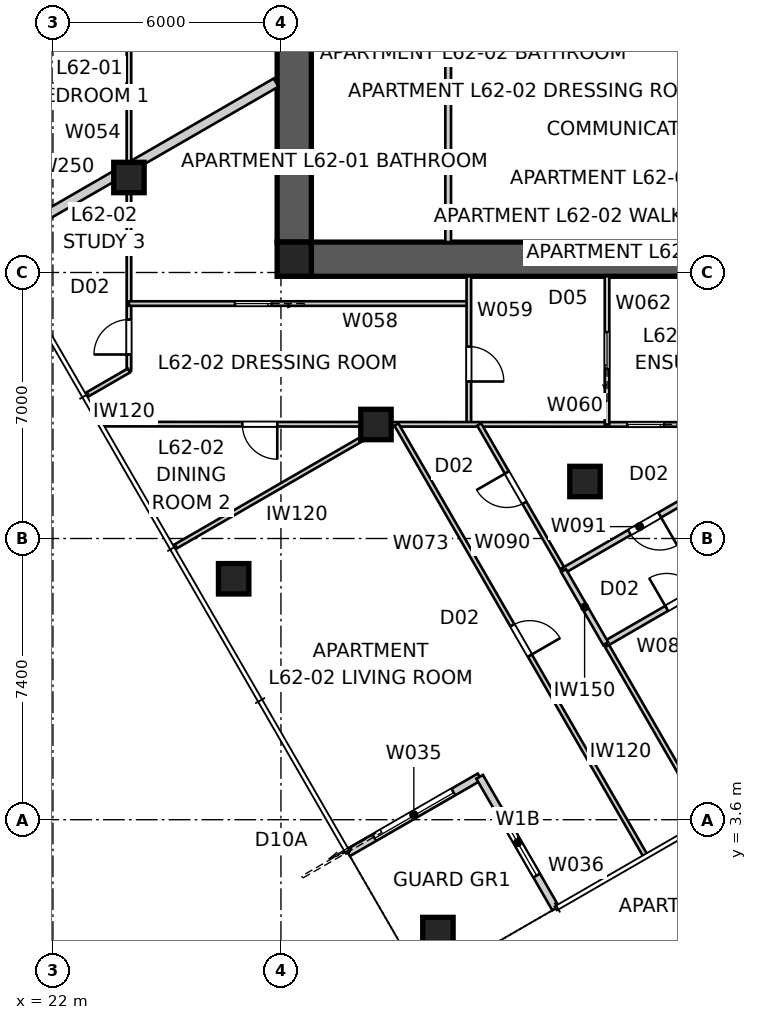
"""IFC4 building model, lengths in metres.
Left out: names, types, materials, properties, quantities, classifications, styles, units other than length and angle.
Written with IfcOpenShell. Run it as: python <this file> out.ifc"""

import sys

from ifc_helpers import new_model, si_unit, direction, frame, frame_2d, origin, origin_2d, place, context, subcontext, project, spatial, polyline, rectangle, outline, extrude, element, fill, save


model = new_model("IFC4")
c1 = context("Model", 3, precision=1e-05, world=origin(), true_north=direction((0.0, 1.0)))
c2 = subcontext(c1, "Body", "Model", "MODEL_VIEW")
j1 = project(units=[si_unit("LENGTHUNIT", "METRE"), si_unit("PLANEANGLEUNIT", "RADIAN")], contexts=[c1])
p1 = place(None, origin())
s1 = spatial("IfcSite", under=j1, at=p1, CompositionType="ELEMENT")
p2 = place(p1, origin())
s2 = spatial("IfcBuilding", under=s1, at=p2, CompositionType="ELEMENT")
p3 = place(p2, frame((0.0, 0.0, 225.2)))
s3 = spatial("IfcBuildingStorey", under=s2, at=p3, CompositionType="ELEMENT", Elevation=225.2)
p4 = place(p3, frame((51.2, 18.35, 0.0), z_axis=(0.0, 0.0, 1.0), x_axis=(-1.0, 0.0, 0.0)))
e1 = element("IfcWall", 1, at=p4, inside=s3, PredefinedType="SHEAR", context=c2, shape_type="SweptSolid", body=[
    extrude(outline(polyline([(0.0, -0.45), (22.4, -0.45), (22.4, -0.025), (22.85, -0.025), (22.85, 0.025), (22.4, 0.025), (22.4, 0.45), (0.0, 0.45), (0.0, 0.025), (-0.45, 0.025), (-0.45, -0.025), (0.0, -0.025), (0.0, -0.45)])), origin(), (0.0, 0.0, 1.0), 3.4),
])
p5 = place(p3, frame((28.35, 41.2, 0.0), z_axis=(0.0, 0.0, 1.0), x_axis=(0.0, -1.0, 0.0)))
e2 = element("IfcWall", 2, at=p5, inside=s3, PredefinedType="SHEAR", context=c2, shape_type="SweptSolid", body=[
    extrude(outline(polyline([(0.0, -0.45), (22.4, -0.45), (22.4, -0.025), (22.85, -0.025), (22.85, 0.025), (22.4, 0.025), (22.4, 0.45), (0.0, 0.45), (0.0, 0.025), (-0.45, 0.025), (-0.45, -0.025), (0.0, -0.025), (0.0, -0.45)])), origin(), (0.0, 0.0, 1.0), 3.4),
])
p6 = place(p5, frame((11.14, 0.0, 0.0)))
e3 = element("IfcOpeningElement", 3, at=p6, cuts=e2, PredefinedType="OPENING", context=c2, shape_type="SweptSolid", body=[
    extrude(rectangle(XDim=1.02, YDim=2.4, at=frame_2d((0.51, 1.2))), frame((0.0, 0.46, 0.0), z_axis=(0.0, -1.0, 0.0), x_axis=(1.0, 0.0, 0.0)), (0.0, 0.0, 1.0), 0.92),
])
p7 = place(p3, frame((28.35, 18.35, 0.0), z_axis=(0.0, 0.0, 1.0), x_axis=(1.0, 0.0, 0.0)))
e4 = element("IfcColumn", 4, at=p7, inside=s3, PredefinedType="COLUMN", context=c2, shape_type="SweptSolid", body=[
    extrude(rectangle(XDim=0.9, YDim=0.9, at=origin_2d()), origin(), (0.0, 0.0, 1.0), 3.4),
])
for number, where, z_axis, x_axis in (
    (5, (32.13, 0.63, 0.0), (0.0, 0.0, 1.0), (1.0, 0.0, 0.0)),
    (6, (26.755, 9.94, 0.0), (0.0, 0.0, 1.0), (1.0, 0.0, 0.0)),
    (7, (24.0, 20.5, 0.0), (0.0, 0.0, 1.0), (1.0, 0.0, 0.0)),
    (8, (30.5, 14.0, 0.0), (0.0, 0.0, 1.0), (1.0, 0.0, 0.0)),
    (9, (36.0, 12.5, 0.0), (0.0, 0.0, 1.0), (1.0, 0.0, 0.0)),
):
    element("IfcColumn", number, at=place(p3, frame(where, z_axis=z_axis, x_axis=x_axis)), inside=s3, PredefinedType="COLUMN", context=c2, shape_type="SweptSolid", body=[
        extrude(rectangle(XDim=0.8, YDim=0.8, at=origin_2d()), origin(), (0.0, 0.0, 1.0), 3.4),
    ])
p8 = place(p3, frame((29.764, 2.729, 0.0), z_axis=(0.0, 0.0, 1.0), x_axis=(0.866026010844, 0.49999894854, 0.0)))
e10 = element("IfcWall", 10, at=p8, inside=s3, PredefinedType="SOLIDWALL", context=c2, shape_type="SweptSolid", body=[
    extrude(rectangle(XDim=4.0, YDim=0.2, at=frame_2d((2.0, 0.0))), origin(), (0.0, 0.0, 1.0), 3.25),
])
p9 = place(p8, frame((0.8, 0.0, 0.0)))
e11 = element("IfcOpeningElement", 11, at=p9, cuts=e10, PredefinedType="OPENING", context=c2, shape_type="SweptSolid", body=[
    extrude(rectangle(XDim=2.4, YDim=2.1, at=frame_2d((1.2, 1.05))), frame((0.0, 0.11, 0.0), z_axis=(0.0, -1.0, 0.0), x_axis=(1.0, 0.0, 0.0)), (0.0, 0.0, 1.0), 0.22),
])
p10 = place(p3, frame((33.229, 4.729, 0.0), z_axis=(0.0, 0.0, 1.0), x_axis=(0.49999894854, -0.866026010844, 0.0)))
e12 = element("IfcWall", 12, at=p10, inside=s3, PredefinedType="SOLIDWALL", context=c2, shape_type="SweptSolid", body=[
    extrude(rectangle(XDim=4.0, YDim=0.2, at=frame_2d((2.0, 0.0))), origin(), (0.0, 0.0, 1.0), 3.25),
])
p11 = place(p10, frame((1.0, 0.0, 0.45)))
e13 = element("IfcOpeningElement", 13, at=p11, cuts=e12, PredefinedType="OPENING", context=c2, shape_type="SweptSolid", body=[
    extrude(rectangle(XDim=2.0, YDim=1.8, at=frame_2d((1.0, 0.9))), frame((0.0, 0.11, 0.0), z_axis=(0.0, -1.0, 0.0), x_axis=(1.0, 0.0, 0.0)), (0.0, 0.0, 1.0), 0.22),
])
p12 = place(p3, frame((20.514, 18.75, 0.0), z_axis=(0.0, 0.0, 1.0), x_axis=(0.866020489494, 0.500008511703, 0.0)))
e14 = element("IfcWall", 14, at=p12, inside=s3, PredefinedType="PARTITIONING", context=c2, shape_type="SweptSolid", body=[
    extrude(rectangle(XDim=8.496, YDim=0.25, at=frame_2d((4.248, 0.0))), origin(), (0.0, 0.0, 1.0), 3.25),
])
p13 = place(p3, frame((32.4, 18.8, 0.0), z_axis=(0.0, 0.0, 1.0), x_axis=(0.0, 1.0, 0.0)))
e15 = element("IfcWall", 15, at=p13, inside=s3, PredefinedType="SOLIDWALL", context=c2, shape_type="SweptSolid", body=[
    extrude(rectangle(XDim=5.9, YDim=0.15, at=frame_2d((2.95, 0.0))), origin(), (0.0, 0.0, 1.0), 3.25),
])
p14 = place(p3, frame((24.0, 15.422, 0.0), z_axis=(0.0, 0.0, 1.0), x_axis=(0.0, 1.0, 0.0)))
e16 = element("IfcWall", 16, at=p14, inside=s3, PredefinedType="PARTITIONING", context=c2, shape_type="SweptSolid", body=[
    extrude(rectangle(XDim=11.177, YDim=0.12, at=frame_2d((5.588, 0.0))), origin(), (0.0, 0.0, 1.0), 2.55),
])
p15 = place(p14, frame((0.42, 0.0, 0.0)))
e17 = element("IfcOpeningElement", 17, at=p15, cuts=e16, PredefinedType="OPENING", context=c2, shape_type="SweptSolid", body=[
    extrude(rectangle(XDim=0.92, YDim=2.34, at=frame_2d((0.46, 1.17))), frame((0.0, 0.07, 0.0), z_axis=(0.0, -1.0, 0.0), x_axis=(1.0, 0.0, 0.0)), (0.0, 0.0, 1.0), 0.14),
])
p16 = place(p3, frame((24.0, 26.103, 0.0), z_axis=(0.0, 0.0, 1.0), x_axis=(-0.866033470286, -0.49998602815, 0.0)))
e18 = element("IfcWall", 18, at=p16, inside=s3, PredefinedType="PARTITIONING", context=c2, shape_type="SweptSolid", body=[
    extrude(rectangle(XDim=6.655, YDim=0.12, at=frame_2d((3.328, 0.0))), origin(), (0.0, 0.0, 1.0), 3.25),
])
p17 = place(p16, frame((2.887, 0.0, 0.0)))
e19 = element("IfcOpeningElement", 19, at=p17, cuts=e18, PredefinedType="OPENING", context=c2, shape_type="SweptSolid", body=[
    extrude(rectangle(XDim=0.92, YDim=2.34, at=frame_2d((0.46, 1.17))), frame((0.0, 0.07, 0.0), z_axis=(0.0, -1.0, 0.0), x_axis=(1.0, 0.0, 0.0)), (0.0, 0.0, 1.0), 0.14),
])
p18 = place(p3, frame((32.944, 17.183, 0.0), z_axis=(0.0, 0.0, 1.0), x_axis=(-1.0, 0.0, 0.0)))
e20 = element("IfcWall", 20, at=p18, inside=s3, PredefinedType="PARTITIONING", context=c2, shape_type="SweptSolid", body=[
    extrude(rectangle(XDim=8.944, YDim=0.12, at=frame_2d((4.472, 0.0))), origin(), (0.0, 0.0, 1.0), 3.25),
])
p19 = place(p18, frame((5.192, 0.0, 0.0)))
e21 = element("IfcOpeningElement", 21, at=p19, cuts=e20, PredefinedType="OPENING", context=c2, shape_type="SweptSolid", body=[
    extrude(rectangle(XDim=0.96, YDim=2.1, at=frame_2d((0.48, 1.05))), frame((0.0, 0.07, 0.0), z_axis=(0.0, -1.0, 0.0), x_axis=(1.0, 0.0, 0.0)), (0.0, 0.0, 1.0), 0.14),
])
p20 = place(p3, frame((32.944, 17.9, 0.0), z_axis=(0.0, 0.0, 1.0), x_axis=(0.0, -1.0, 0.0)))
e22 = element("IfcWall", 22, at=p20, inside=s3, PredefinedType="PARTITIONING", context=c2, shape_type="SweptSolid", body=[
    extrude(rectangle(XDim=3.9, YDim=0.12, at=frame_2d((1.95, 0.0))), origin(), (0.0, 0.0, 1.0), 3.25),
])
p21 = place(p20, frame((1.849, 0.0, 0.0)))
e23 = element("IfcOpeningElement", 23, at=p21, cuts=e22, PredefinedType="OPENING", context=c2, shape_type="SweptSolid", body=[
    extrude(rectangle(XDim=0.92, YDim=2.34, at=frame_2d((0.46, 1.17))), frame((0.0, 0.07, 0.0), z_axis=(0.0, -1.0, 0.0), x_axis=(1.0, 0.0, 0.0)), (0.0, 0.0, 1.0), 0.14),
])
p22 = place(p3, frame((40.217, 14.0, 0.0), z_axis=(0.0, 0.0, 1.0), x_axis=(-0.999999825002, 0.000591604877, 0.0)))
e24 = element("IfcWall", 24, at=p22, inside=s3, PredefinedType="PARTITIONING", context=c2, shape_type="SweptSolid", body=[
    extrude(rectangle(XDim=16.92, YDim=0.12, at=frame_2d((8.46, 0.0))), origin(), (0.0, 0.0, 1.0), 2.55),
])
p23 = place(p22, frame((2.14, 0.0, 0.0)))
e25 = element("IfcOpeningElement", 25, at=p23, cuts=e24, PredefinedType="OPENING", context=c2, shape_type="SweptSolid", body=[
    extrude(rectangle(XDim=0.96, YDim=2.1, at=frame_2d((0.48, 1.05))), frame((0.0, 0.07, 0.0), z_axis=(0.0, -1.0, 0.0), x_axis=(1.0, 0.0, 0.0)), (0.0, 0.0, 1.0), 0.14),
])
p24 = place(p22, frame((12.313, 0.0, 0.0)))
e26 = element("IfcOpeningElement", 26, at=p24, cuts=e24, PredefinedType="OPENING", context=c2, shape_type="SweptSolid", body=[
    extrude(rectangle(XDim=0.92, YDim=2.34, at=frame_2d((0.46, 1.17))), frame((0.0, 0.07, 0.0), z_axis=(0.0, -1.0, 0.0), x_axis=(1.0, 0.0, 0.0)), (0.0, 0.0, 1.0), 0.14),
])
p25 = place(p3, frame((22.862, 14.765, 0.0), z_axis=(0.0, 0.0, 1.0), x_axis=(0.866040225545, 0.499974327079, 0.0)))
e27 = element("IfcWall", 27, at=p25, inside=s3, PredefinedType="PARTITIONING", context=c2, shape_type="SweptSolid", body=[
    extrude(rectangle(XDim=1.314, YDim=0.12, at=frame_2d((0.657, 0.0))), origin(), (0.0, 0.0, 1.0), 3.25),
])
p26 = place(p3, frame((36.581, 14.0, 0.0), z_axis=(0.0, 0.0, 1.0), x_axis=(0.0, 1.0, 0.0)))
e28 = element("IfcWall", 28, at=p26, inside=s3, PredefinedType="PARTITIONING", context=c2, shape_type="SweptSolid", body=[
    extrude(rectangle(XDim=3.9, YDim=0.12, at=frame_2d((1.95, 0.0))), origin(), (0.0, 0.0, 1.0), 3.25),
])
p27 = place(p26, frame((1.47, 0.0, 0.0)))
e29 = element("IfcOpeningElement", 29, at=p27, cuts=e28, PredefinedType="OPENING", context=c2, shape_type="SweptSolid", body=[
    extrude(rectangle(XDim=0.96, YDim=2.1, at=frame_2d((0.48, 1.05))), frame((0.0, 0.07, 0.0), z_axis=(0.0, -1.0, 0.0), x_axis=(1.0, 0.0, 0.0)), (0.0, 0.0, 1.0), 0.14),
])
p28 = place(p3, frame((31.039, 14.0, 0.0), z_axis=(0.0, 0.0, 1.0), x_axis=(0.500006184843, -0.866021832934, 0.0)))
e30 = element("IfcWall", 30, at=p28, inside=s3, PredefinedType="PARTITIONING", context=c2, shape_type="SweptSolid", body=[
    extrude(rectangle(XDim=13.084, YDim=0.12, at=frame_2d((6.542, 0.0))), origin(), (0.0, 0.0, 1.0), 3.25),
])
p29 = place(p28, frame((6.102, 0.0, 0.0)))
e31 = element("IfcOpeningElement", 31, at=p29, cuts=e30, PredefinedType="OPENING", context=c2, shape_type="SweptSolid", body=[
    extrude(rectangle(XDim=0.92, YDim=2.34, at=frame_2d((0.46, 1.17))), frame((0.0, 0.07, 0.0), z_axis=(0.0, -1.0, 0.0), x_axis=(1.0, 0.0, 0.0)), (0.0, 0.0, 1.0), 0.14),
])
p30 = place(p3, frame((25.174, 10.759, 0.0), z_axis=(0.0, 0.0, 1.0), x_axis=(0.866023120914, 0.500003954026, 0.0)))
e32 = element("IfcWall", 32, at=p30, inside=s3, PredefinedType="PARTITIONING", context=c2, shape_type="SweptSolid", body=[
    extrude(rectangle(XDim=6.481, YDim=0.12, at=frame_2d((3.241, 0.0))), origin(), (0.0, 0.0, 1.0), 3.25),
])
p31 = place(p3, frame((39.214, 3.612, 0.0), z_axis=(0.0, 0.0, 1.0), x_axis=(-0.499995631649, 0.866027925839, 0.0)))
e33 = element("IfcWall", 33, at=p31, inside=s3, PredefinedType="PARTITIONING", context=c2, shape_type="SweptSolid", body=[
    extrude(rectangle(XDim=5.338, YDim=0.12, at=frame_2d((2.669, 0.0))), origin(), (0.0, 0.0, 1.0), 3.25),
])
p32 = place(p3, frame((36.545, 8.234, 0.0), z_axis=(0.0, 0.0, 1.0), x_axis=(0.866025598446, 0.499999662836, 0.0)))
e34 = element("IfcWall", 34, at=p32, inside=s3, PredefinedType="SOLIDWALL", context=c2, shape_type="SweptSolid", body=[
    extrude(rectangle(XDim=4.625, YDim=0.15, at=frame_2d((2.312, 0.0))), origin(), (0.0, 0.0, 1.0), 3.25),
])
p33 = place(p32, frame((1.853, 0.0, 0.0)))
e35 = element("IfcOpeningElement", 35, at=p33, cuts=e34, PredefinedType="OPENING", context=c2, shape_type="SweptSolid", body=[
    extrude(rectangle(XDim=0.92, YDim=2.34, at=frame_2d((0.46, 1.17))), frame((0.0, 0.085, 0.0), z_axis=(0.0, -1.0, 0.0), x_axis=(1.0, 0.0, 0.0)), (0.0, 0.0, 1.0), 0.17),
])
p34 = place(p3, frame((35.435, 10.156, 0.0), z_axis=(0.0, 0.0, 1.0), x_axis=(-0.499966886051, 0.866044521288, 0.0)))
e36 = element("IfcWall", 36, at=p34, inside=s3, PredefinedType="PARTITIONING", context=c2, shape_type="SweptSolid", body=[
    extrude(rectangle(XDim=4.438, YDim=0.12, at=frame_2d((2.219, 0.0))), origin(), (0.0, 0.0, 1.0), 3.25),
])
p35 = place(p34, frame((2.059, 0.0, 0.0)))
e37 = element("IfcOpeningElement", 37, at=p35, cuts=e36, PredefinedType="OPENING", context=c2, shape_type="SweptSolid", body=[
    extrude(rectangle(XDim=0.92, YDim=2.34, at=frame_2d((0.46, 1.17))), frame((0.0, 0.07, 0.0), z_axis=(0.0, -1.0, 0.0), x_axis=(1.0, 0.0, 0.0)), (0.0, 0.0, 1.0), 0.14),
])
p36 = place(p3, frame((39.441, 12.469, 0.0), z_axis=(0.0, 0.0, 1.0), x_axis=(-0.866025598446, -0.499999662836, 0.0)))
e38 = element("IfcWall", 38, at=p36, inside=s3, PredefinedType="SOLIDWALL", context=c2, shape_type="SweptSolid", body=[
    extrude(rectangle(XDim=4.625, YDim=0.15, at=frame_2d((2.312, 0.0))), origin(), (0.0, 0.0, 1.0), 3.25),
])
p37 = place(p36, frame((1.702, 0.0, 0.0)))
e39 = element("IfcOpeningElement", 39, at=p37, cuts=e38, PredefinedType="OPENING", context=c2, shape_type="SweptSolid", body=[
    extrude(rectangle(XDim=0.92, YDim=2.34, at=frame_2d((0.46, 1.17))), frame((0.0, 0.085, 0.0), z_axis=(0.0, -1.0, 0.0), x_axis=(1.0, 0.0, 0.0)), (0.0, 0.0, 1.0), 0.17),
])
p38 = place(p3, frame((35.435, 10.156, 0.0), z_axis=(0.0, 0.0, 1.0), x_axis=(0.500008142102, -0.866020702889, 0.0)))
e40 = element("IfcWall", 40, at=p38, inside=s3, PredefinedType="SOLIDWALL", context=c2, shape_type="SweptSolid", body=[
    extrude(rectangle(XDim=2.219, YDim=0.15, at=frame_2d((1.11, 0.0))), origin(), (0.0, 0.0, 1.0), 3.25),
])
p39 = place(p9, origin())
e41 = element("IfcDoor", 41, at=p39, inside=s3, OperationType="SLIDING_TO_LEFT", PredefinedType="DOOR", context=c2, shape_type="SweptSolid", body=[
    extrude(rectangle(XDim=2.4, YDim=2.1, at=frame_2d((1.2, 1.05))), frame((0.0, 0.025, 0.0), z_axis=(0.0, -1.0, 0.0), x_axis=(1.0, 0.0, 0.0)), (0.0, 0.0, 1.0), 0.05),
])
fill(e11, e41)
p40 = place(p11, origin())
e42 = element("IfcWindow", 42, at=p40, inside=s3, PartitioningType="SINGLE_PANEL", PredefinedType="WINDOW", context=c2, shape_type="SweptSolid", body=[
    extrude(rectangle(XDim=2.0, YDim=1.8, at=frame_2d((1.0, 0.9))), frame((0.0, 0.03, 0.0), z_axis=(0.0, -1.0, 0.0), x_axis=(1.0, 0.0, 0.0)), (0.0, 0.0, 1.0), 0.06),
])
fill(e13, e42)
p41 = place(p27, origin())
e43 = element("IfcDoor", 43, at=p41, inside=s3, OperationType="SLIDING_TO_LEFT", PredefinedType="DOOR", context=c2, shape_type="SweptSolid", body=[
    extrude(rectangle(XDim=0.96, YDim=2.1, at=frame_2d((0.48, 1.05))), frame((0.0, 0.025, 0.0), z_axis=(0.0, -1.0, 0.0), x_axis=(1.0, 0.0, 0.0)), (0.0, 0.0, 1.0), 0.05),
])
fill(e29, e43)
p42 = place(p23, origin())
e44 = element("IfcDoor", 44, at=p42, inside=s3, OperationType="SLIDING_TO_LEFT", PredefinedType="DOOR", context=c2, shape_type="SweptSolid", body=[
    extrude(rectangle(XDim=0.96, YDim=2.1, at=frame_2d((0.48, 1.05))), frame((0.0, 0.025, 0.0), z_axis=(0.0, -1.0, 0.0), x_axis=(1.0, 0.0, 0.0)), (0.0, 0.0, 1.0), 0.05),
])
fill(e25, e44)
p43 = place(p21, origin())
e45 = element("IfcDoor", 45, at=p43, inside=s3, OperationType="SINGLE_SWING_RIGHT", PredefinedType="DOOR", context=c2, shape_type="SweptSolid", body=[
    extrude(rectangle(XDim=0.92, YDim=2.34, at=frame_2d((0.46, 1.17))), frame((0.0, 0.025, 0.0), z_axis=(0.0, -1.0, 0.0), x_axis=(1.0, 0.0, 0.0)), (0.0, 0.0, 1.0), 0.05),
])
fill(e23, e45)
p44 = place(p37, origin())
e46 = element("IfcDoor", 46, at=p44, inside=s3, OperationType="SINGLE_SWING_LEFT", PredefinedType="DOOR", context=c2, shape_type="SweptSolid", body=[
    extrude(rectangle(XDim=0.92, YDim=2.34, at=frame_2d((0.46, 1.17))), frame((0.0, 0.025, 0.0), z_axis=(0.0, -1.0, 0.0), x_axis=(1.0, 0.0, 0.0)), (0.0, 0.0, 1.0), 0.05),
])
fill(e39, e46)
p45 = place(p35, origin())
e47 = element("IfcDoor", 47, at=p45, inside=s3, OperationType="SINGLE_SWING_RIGHT", PredefinedType="DOOR", context=c2, shape_type="SweptSolid", body=[
    extrude(rectangle(XDim=0.92, YDim=2.34, at=frame_2d((0.46, 1.17))), frame((0.0, 0.025, 0.0), z_axis=(0.0, -1.0, 0.0), x_axis=(1.0, 0.0, 0.0)), (0.0, 0.0, 1.0), 0.05),
])
fill(e37, e47)
p46 = place(p19, origin())
e48 = element("IfcDoor", 48, at=p46, inside=s3, OperationType="SLIDING_TO_LEFT", PredefinedType="DOOR", context=c2, shape_type="SweptSolid", body=[
    extrude(rectangle(XDim=0.96, YDim=2.1, at=frame_2d((0.48, 1.05))), frame((0.0, 0.025, 0.0), z_axis=(0.0, -1.0, 0.0), x_axis=(1.0, 0.0, 0.0)), (0.0, 0.0, 1.0), 0.05),
])
fill(e21, e48)
p47 = place(p24, origin())
e49 = element("IfcDoor", 49, at=p47, inside=s3, OperationType="SINGLE_SWING_LEFT", PredefinedType="DOOR", context=c2, shape_type="SweptSolid", body=[
    extrude(rectangle(XDim=0.92, YDim=2.34, at=frame_2d((0.46, 1.17))), frame((0.0, 0.025, 0.0), z_axis=(0.0, -1.0, 0.0), x_axis=(1.0, 0.0, 0.0)), (0.0, 0.0, 1.0), 0.05),
])
fill(e26, e49)
p48 = place(p15, origin())
e50 = element("IfcDoor", 50, at=p48, inside=s3, OperationType="SINGLE_SWING_LEFT", PredefinedType="DOOR", context=c2, shape_type="SweptSolid", body=[
    extrude(rectangle(XDim=0.92, YDim=2.34, at=frame_2d((0.46, 1.17))), frame((0.0, 0.025, 0.0), z_axis=(0.0, -1.0, 0.0), x_axis=(1.0, 0.0, 0.0)), (0.0, 0.0, 1.0), 0.05),
])
fill(e17, e50)
p49 = place(p33, origin())
e51 = element("IfcDoor", 51, at=p49, inside=s3, OperationType="SINGLE_SWING_LEFT", PredefinedType="DOOR", context=c2, shape_type="SweptSolid", body=[
    extrude(rectangle(XDim=0.92, YDim=2.34, at=frame_2d((0.46, 1.17))), frame((0.0, 0.025, 0.0), z_axis=(0.0, -1.0, 0.0), x_axis=(1.0, 0.0, 0.0)), (0.0, 0.0, 1.0), 0.05),
])
fill(e35, e51)
p50 = place(p29, origin())
e52 = element("IfcDoor", 52, at=p50, inside=s3, OperationType="SINGLE_SWING_RIGHT", PredefinedType="DOOR", context=c2, shape_type="SweptSolid", body=[
    extrude(rectangle(XDim=0.92, YDim=2.34, at=frame_2d((0.46, 1.17))), frame((0.0, 0.025, 0.0), z_axis=(0.0, -1.0, 0.0), x_axis=(1.0, 0.0, 0.0)), (0.0, 0.0, 1.0), 0.05),
])
fill(e31, e52)
save(model, sys.argv[1])
